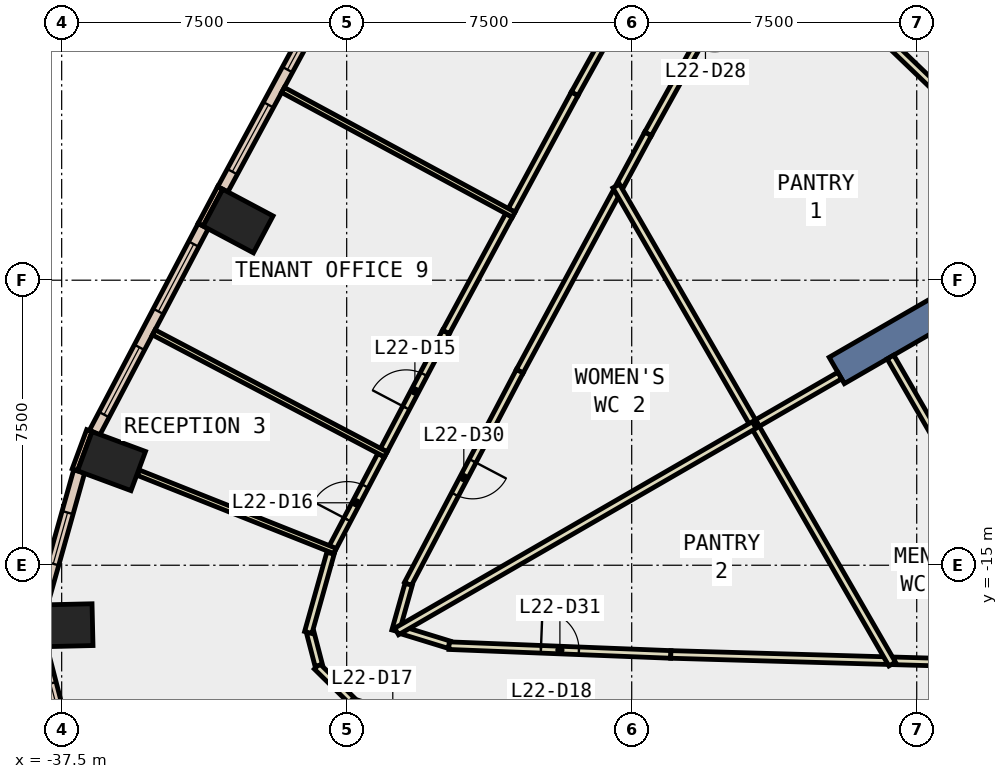
"""IFC4 building model, lengths in metres.
Left out: names, types, materials, properties, quantities, classifications, styles, units other than length and angle.
Written with IfcOpenShell. Run it as: python <this file> out.ifc"""

import sys

from ifc_helpers import new_model, si_unit, direction, frame, frame_2d, origin, origin_2d, place, context, subcontext, project, spatial, rectangle, extrude, element, fill, save


model = new_model("IFC4")
c1 = context("Model", 3, precision=1e-05, world=origin(), true_north=direction((0.0, 1.0)))
c2 = subcontext(c1, "Body", "Model", "MODEL_VIEW")
j1 = project(units=[si_unit("LENGTHUNIT", "METRE"), si_unit("PLANEANGLEUNIT", "RADIAN")], contexts=[c1])
p1 = place(None, origin())
s1 = spatial("IfcSite", under=j1, at=p1, CompositionType="ELEMENT")
p2 = place(p1, origin())
s2 = spatial("IfcBuilding", under=s1, at=p2, CompositionType="ELEMENT")
p3 = place(p2, frame((0.0, 0.0, 103.4)))
s3 = spatial("IfcBuildingStorey", under=s2, at=p3, CompositionType="ELEMENT", Elevation=103.4)
for number, where, z_axis, x_axis in (
    (1, (-32.858, -5.943, -0.4), (0.0, 0.0, 1.0), (0.469, 0.883, 0.0)),
    (2, (-36.188, -12.261, -0.4), (0.0, 0.0, 1.0), (0.347, 0.938, 0.0)),
    (3, (-37.438, -16.581, -0.4), (0.0, 0.0, 1.0), (-0.023, 1.0, 0.0)),
):
    element("IfcColumn", number, at=place(p3, frame(where, z_axis=z_axis, x_axis=x_axis)), inside=s3, PredefinedType="COLUMN", context=c2, shape_type="SweptSolid", body=[
        extrude(rectangle(XDim=1.1, YDim=1.5, at=origin_2d()), origin(), (0.0, 0.0, 1.0), 4.2),
    ])
p4 = place(p3, frame((-9.31, -5.375, -0.4), z_axis=(0.0, 0.0, 1.0), x_axis=(-0.866017533419, -0.500013631625, 0.0)))
e4 = element("IfcWall", 4, at=p4, inside=s3, PredefinedType="SHEAR", context=c2, shape_type="SweptSolid", body=[
    extrude(rectangle(XDim=9.0, YDim=0.8, at=frame_2d((4.5, 0.0))), origin(), (0.0, 0.0, 1.0), 4.2),
])
p5 = place(p3, frame((-33.329, -5.071, 0.0), z_axis=(0.0, 0.0, 1.0), x_axis=(-0.46919310775, -0.883095593716, 0.0)))
e5 = element("IfcWall", 5, at=p5, inside=s3, PredefinedType="STANDARD", context=c2, shape_type="SweptSolid", body=[
    extrude(rectangle(XDim=1.099, YDim=0.15, at=frame_2d((0.55, 0.0))), origin(), (0.0, 0.0, 1.0), 3.8),
])
p6 = place(p3, frame((-36.771, -11.458, 0.0), z_axis=(0.0, 0.0, 1.0), x_axis=(-0.347205967468, -0.937788897436, 0.0)))
e6 = element("IfcWall", 6, at=p6, inside=s3, PredefinedType="STANDARD", context=c2, shape_type="SweptSolid", body=[
    extrude(rectangle(XDim=1.1, YDim=0.15, at=frame_2d((0.55, 0.0))), origin(), (0.0, 0.0, 1.0), 3.8),
])
p7 = place(p3, frame((-30.357, 0.262, 0.0), z_axis=(0.0, 0.0, 1.0), x_axis=(-0.475573079782, -0.879676216449, 0.0)))
e7 = element("IfcWall", 7, at=p7, inside=s3, PredefinedType="STANDARD", context=c2, shape_type="SweptSolid", body=[
    extrude(rectangle(XDim=6.104, YDim=0.3, at=frame_2d((3.052, 0.0))), origin(), (0.0, 0.0, 1.0), 3.8),
])
p8 = place(p7, frame((0.526, 0.0, 0.9)))
e8 = element("IfcOpeningElement", 8, at=p8, cuts=e7, PredefinedType="OPENING", context=c2, shape_type="SweptSolid", body=[
    extrude(rectangle(XDim=2.0, YDim=2.6, at=frame_2d((1.0, 1.3))), frame((0.0, 0.16, 0.0), z_axis=(0.0, -1.0, 0.0), x_axis=(1.0, 0.0, 0.0)), (0.0, 0.0, 1.0), 0.32),
])
p9 = place(p7, frame((3.578, 0.0, 0.9)))
e9 = element("IfcOpeningElement", 9, at=p9, cuts=e7, PredefinedType="OPENING", context=c2, shape_type="SweptSolid", body=[
    extrude(rectangle(XDim=2.0, YDim=2.6, at=frame_2d((1.0, 1.3))), frame((0.0, 0.16, 0.0), z_axis=(0.0, -1.0, 0.0), x_axis=(1.0, 0.0, 0.0)), (0.0, 0.0, 1.0), 0.32),
])
p10 = place(p3, frame((-33.776, -6.077, 0.0), z_axis=(0.0, 0.0, 1.0), x_axis=(-0.465380908665, -0.88511050714, 0.0)))
e10 = element("IfcWall", 10, at=p10, inside=s3, PredefinedType="STANDARD", context=c2, shape_type="SweptSolid", body=[
    extrude(rectangle(XDim=6.139, YDim=0.3, at=frame_2d((3.07, 0.0))), origin(), (0.0, 0.0, 1.0), 3.8),
])
p11 = place(p10, frame((0.535, 0.0, 0.9)))
e11 = element("IfcOpeningElement", 11, at=p11, cuts=e10, PredefinedType="OPENING", context=c2, shape_type="SweptSolid", body=[
    extrude(rectangle(XDim=2.0, YDim=2.6, at=frame_2d((1.0, 1.3))), frame((0.0, 0.16, 0.0), z_axis=(0.0, -1.0, 0.0), x_axis=(1.0, 0.0, 0.0)), (0.0, 0.0, 1.0), 0.32),
])
p12 = place(p10, frame((3.604, 0.0, 0.9)))
e12 = element("IfcOpeningElement", 12, at=p12, cuts=e10, PredefinedType="OPENING", context=c2, shape_type="SweptSolid", body=[
    extrude(rectangle(XDim=2.0, YDim=2.6, at=frame_2d((1.0, 1.3))), frame((0.0, 0.16, 0.0), z_axis=(0.0, -1.0, 0.0), x_axis=(1.0, 0.0, 0.0)), (0.0, 0.0, 1.0), 0.32),
])
p13 = place(p3, frame((-37.04, -12.531, 0.0), z_axis=(0.0, 0.0, 1.0), x_axis=(-0.270054089595, -0.96284515302, 0.0)))
e13 = element("IfcWall", 13, at=p13, inside=s3, PredefinedType="STANDARD", context=c2, shape_type="SweptSolid", body=[
    extrude(rectangle(XDim=3.651, YDim=0.3, at=frame_2d((1.825, 0.0))), origin(), (0.0, 0.0, 1.0), 3.8),
])
p14 = place(p13, frame((1.125, 0.0, 0.9)))
e14 = element("IfcOpeningElement", 14, at=p14, cuts=e13, PredefinedType="OPENING", context=c2, shape_type="SweptSolid", body=[
    extrude(rectangle(XDim=1.4, YDim=2.6, at=frame_2d((0.7, 1.3))), frame((0.0, 0.16, 0.0), z_axis=(0.0, -1.0, 0.0), x_axis=(1.0, 0.0, 0.0)), (0.0, 0.0, 1.0), 0.32),
])
p15 = place(p3, frame((-38.042, -17.144, 0.0), z_axis=(0.0, 0.0, 1.0), x_axis=(0.251046938153, -0.967974914367, 0.0)))
e15 = element("IfcWall", 15, at=p15, inside=s3, PredefinedType="STANDARD", context=c2, shape_type="SweptSolid", body=[
    extrude(rectangle(XDim=3.398, YDim=0.3, at=frame_2d((1.699, 0.0))), origin(), (0.0, 0.0, 1.0), 3.8),
])
p16 = place(p15, frame((0.999, 0.0, 0.9)))
e16 = element("IfcOpeningElement", 16, at=p16, cuts=e15, PredefinedType="OPENING", context=c2, shape_type="SweptSolid", body=[
    extrude(rectangle(XDim=1.4, YDim=2.6, at=frame_2d((0.7, 1.3))), frame((0.0, 0.16, 0.0), z_axis=(0.0, -1.0, 0.0), x_axis=(1.0, 0.0, 0.0)), (0.0, 0.0, 1.0), 0.32),
])
p17 = place(p3, frame((-19.047, 1.799, 0.0), z_axis=(0.0, 0.0, 1.0), x_axis=(-0.485240396382, -0.87438078531, 0.0)))
e17 = element("IfcWall", 17, at=p17, inside=s3, PredefinedType="PARTITIONING", context=c2, shape_type="SweptSolid", body=[
    extrude(rectangle(XDim=6.232, YDim=0.2, at=frame_2d((3.116, 0.0))), origin(), (0.0, 0.0, 1.0), 3.8),
])
p18 = place(p17, frame((2.616, 0.0, 0.0)))
e18 = element("IfcOpeningElement", 18, at=p18, cuts=e17, PredefinedType="OPENING", context=c2, shape_type="SweptSolid", body=[
    extrude(rectangle(XDim=1.0, YDim=2.1, at=frame_2d((0.5, 1.05))), frame((0.0, 0.11, 0.0), z_axis=(0.0, -1.0, 0.0), x_axis=(1.0, 0.0, 0.0)), (0.0, 0.0, 1.0), 0.22),
])
p19 = place(p3, frame((-22.071, -3.65, 0.0), z_axis=(0.0, 0.0, 1.0), x_axis=(-0.475212034938, -0.879871309823, 0.0)))
e19 = element("IfcWall", 19, at=p19, inside=s3, PredefinedType="PARTITIONING", context=c2, shape_type="SweptSolid", body=[
    extrude(rectangle(XDim=1.557, YDim=0.2, at=frame_2d((0.779, 0.0))), origin(), (0.0, 0.0, 1.0), 3.8),
])
p20 = place(p3, frame((-15.596, -17.516, 0.0), z_axis=(0.0, 0.0, 1.0), x_axis=(0.99959813819, -0.028347171427, 0.0)))
e20 = element("IfcWall", 20, at=p20, inside=s3, PredefinedType="PARTITIONING", context=c2, shape_type="SweptSolid", body=[
    extrude(rectangle(XDim=1.016, YDim=0.2, at=frame_2d((0.508, 0.0))), origin(), (0.0, 0.0, 1.0), 3.8),
])
p21 = place(p3, frame((-22.906, -5.196, 0.0), z_axis=(0.0, 0.0, 1.0), x_axis=(-0.475448213767, -0.879743710421, 0.0)))
e21 = element("IfcWall", 21, at=p21, inside=s3, PredefinedType="PARTITIONING", context=c2, shape_type="SweptSolid", body=[
    extrude(rectangle(XDim=5.343, YDim=0.2, at=frame_2d((2.671, 0.0))), origin(), (0.0, 0.0, 1.0), 3.8),
])
p22 = place(p3, frame((-25.446, -9.896, 0.0), z_axis=(0.0, 0.0, 1.0), x_axis=(-0.465367816287, -0.885117390838, 0.0)))
e22 = element("IfcWall", 22, at=p22, inside=s3, PredefinedType="PARTITIONING", context=c2, shape_type="SweptSolid", body=[
    extrude(rectangle(XDim=6.326, YDim=0.2, at=frame_2d((3.163, 0.0))), origin(), (0.0, 0.0, 1.0), 3.8),
])
p23 = place(p22, frame((2.663, 0.0, 0.0)))
e23 = element("IfcOpeningElement", 23, at=p23, cuts=e22, PredefinedType="OPENING", context=c2, shape_type="SweptSolid", body=[
    extrude(rectangle(XDim=1.0, YDim=2.1, at=frame_2d((0.5, 1.05))), frame((0.0, 0.11, 0.0), z_axis=(0.0, -1.0, 0.0), x_axis=(1.0, 0.0, 0.0)), (0.0, 0.0, 1.0), 0.22),
])
p24 = place(p3, frame((-28.37, -15.503, 0.0), z_axis=(0.0, 0.0, 1.0), x_axis=(-0.270645732093, -0.962679015924, 0.0)))
e24 = element("IfcWall", 24, at=p24, inside=s3, PredefinedType="PARTITIONING", context=c2, shape_type="SweptSolid", body=[
    extrude(rectangle(XDim=1.275, YDim=0.2, at=frame_2d((0.637, 0.0))), origin(), (0.0, 0.0, 1.0), 3.8),
])
p25 = place(p3, frame((-28.503, -16.722, 0.0), z_axis=(0.0, 0.0, 1.0), x_axis=(0.95579582576, -0.294031187904, 0.0)))
e25 = element("IfcWall", 25, at=p25, inside=s3, PredefinedType="PARTITIONING", context=c2, shape_type="SweptSolid", body=[
    extrude(rectangle(XDim=1.255, YDim=0.2, at=frame_2d((0.628, 0.0))), origin(), (0.0, 0.0, 1.0), 3.8),
])
p26 = place(p3, frame((-27.307, -17.116, 0.0), z_axis=(0.0, 0.0, 1.0), x_axis=(0.999217829656, -0.039544012168, 0.0)))
e26 = element("IfcWall", 26, at=p26, inside=s3, PredefinedType="PARTITIONING", context=c2, shape_type="SweptSolid", body=[
    extrude(rectangle(XDim=5.841, YDim=0.2, at=frame_2d((2.92, 0.0))), origin(), (0.0, 0.0, 1.0), 3.8),
])
p27 = place(p26, frame((2.42, 0.0, 0.0)))
e27 = element("IfcOpeningElement", 27, at=p27, cuts=e26, PredefinedType="OPENING", context=c2, shape_type="SweptSolid", body=[
    extrude(rectangle(XDim=1.0, YDim=2.1, at=frame_2d((0.5, 1.05))), frame((0.0, 0.11, 0.0), z_axis=(0.0, -1.0, 0.0), x_axis=(1.0, 0.0, 0.0)), (0.0, 0.0, 1.0), 0.22),
])
p28 = place(p3, frame((-21.471, -17.347, 0.0), z_axis=(0.0, 0.0, 1.0), x_axis=(0.999587337564, -0.028725504044, 0.0)))
e28 = element("IfcWall", 28, at=p28, inside=s3, PredefinedType="PARTITIONING", context=c2, shape_type="SweptSolid", body=[
    extrude(rectangle(XDim=5.677, YDim=0.2, at=frame_2d((2.839, 0.0))), origin(), (0.0, 0.0, 1.0), 3.8),
])
p29 = place(p3, frame((-25.658, -5.661, 0.0), z_axis=(0.0, 0.0, 1.0), x_axis=(0.47543942367, 0.87974846088, 0.0)))
e29 = element("IfcWall", 29, at=p29, inside=s3, PredefinedType="PARTITIONING", context=c2, shape_type="SweptSolid", body=[
    extrude(rectangle(XDim=3.487, YDim=0.2, at=frame_2d((1.744, 0.0))), origin(), (0.0, 0.0, 1.0), 3.8),
])
p30 = place(p3, frame((-24.0, -2.593, 0.0), z_axis=(0.0, 0.0, 1.0), x_axis=(0.485148833338, 0.874431592242, 0.0)))
e30 = element("IfcWall", 30, at=p30, inside=s3, PredefinedType="PARTITIONING", context=c2, shape_type="SweptSolid", body=[
    extrude(rectangle(XDim=7.049, YDim=0.2, at=frame_2d((3.525, 0.0))), origin(), (0.0, 0.0, 1.0), 3.8),
])
p31 = place(p30, frame((3.099, 0.0, 0.0)))
e31 = element("IfcOpeningElement", 31, at=p31, cuts=e30, PredefinedType="OPENING", context=c2, shape_type="SweptSolid", body=[
    extrude(rectangle(XDim=1.0, YDim=2.1, at=frame_2d((0.5, 1.05))), frame((0.0, 0.11, 0.0), z_axis=(0.0, -1.0, 0.0), x_axis=(1.0, 0.0, 0.0)), (0.0, 0.0, 1.0), 0.22),
])
p32 = place(p3, frame((-29.023, -11.972, 0.0), z_axis=(0.0, 0.0, 1.0), x_axis=(0.465457263931, 0.885070356217, 0.0)))
e32 = element("IfcWall", 32, at=p32, inside=s3, PredefinedType="PARTITIONING", context=c2, shape_type="SweptSolid", body=[
    extrude(rectangle(XDim=3.515, YDim=0.2, at=frame_2d((1.757, 0.0))), origin(), (0.0, 0.0, 1.0), 3.8),
])
p33 = place(p32, frame((1.257, 0.0, 0.0)))
e33 = element("IfcOpeningElement", 33, at=p33, cuts=e32, PredefinedType="OPENING", context=c2, shape_type="SweptSolid", body=[
    extrude(rectangle(XDim=1.0, YDim=2.1, at=frame_2d((0.5, 1.05))), frame((0.0, 0.11, 0.0), z_axis=(0.0, -1.0, 0.0), x_axis=(1.0, 0.0, 0.0)), (0.0, 0.0, 1.0), 0.22),
])
p34 = place(p3, frame((-27.387, -8.861, 0.0), z_axis=(0.0, 0.0, 1.0), x_axis=(0.475193364801, 0.879881393171, 0.0)))
e34 = element("IfcWall", 34, at=p34, inside=s3, PredefinedType="PARTITIONING", context=c2, shape_type="SweptSolid", body=[
    extrude(rectangle(XDim=3.487, YDim=0.2, at=frame_2d((1.744, 0.0))), origin(), (0.0, 0.0, 1.0), 3.8),
])
p35 = place(p3, frame((-30.41, -14.61, 0.0), z_axis=(0.0, 0.0, 1.0), x_axis=(0.46516343569, 0.885224817827, 0.0)))
e35 = element("IfcWall", 35, at=p35, inside=s3, PredefinedType="PARTITIONING", context=c2, shape_type="SweptSolid", body=[
    extrude(rectangle(XDim=2.831, YDim=0.2, at=frame_2d((1.416, 0.0))), origin(), (0.0, 0.0, 1.0), 3.8),
])
p36 = place(p35, frame((0.916, 0.0, 0.0)))
e36 = element("IfcOpeningElement", 36, at=p36, cuts=e35, PredefinedType="OPENING", context=c2, shape_type="SweptSolid", body=[
    extrude(rectangle(XDim=1.0, YDim=2.1, at=frame_2d((0.5, 1.05))), frame((0.0, 0.11, 0.0), z_axis=(0.0, -1.0, 0.0), x_axis=(1.0, 0.0, 0.0)), (0.0, 0.0, 1.0), 0.22),
])
p37 = place(p3, frame((-27.676, -19.278, 0.0), z_axis=(0.0, 0.0, 1.0), x_axis=(-0.95581080774, 0.293982482143, 0.0)))
e37 = element("IfcWall", 37, at=p37, inside=s3, PredefinedType="PARTITIONING", context=c2, shape_type="SweptSolid", body=[
    extrude(rectangle(XDim=2.324, YDim=0.2, at=frame_2d((1.162, 0.0))), origin(), (0.0, 0.0, 1.0), 3.8),
])
p38 = place(p37, frame((0.662, 0.0, 0.0)))
e38 = element("IfcOpeningElement", 38, at=p38, cuts=e37, PredefinedType="OPENING", context=c2, shape_type="SweptSolid", body=[
    extrude(rectangle(XDim=1.0, YDim=2.1, at=frame_2d((0.5, 1.05))), frame((0.0, 0.11, 0.0), z_axis=(0.0, -1.0, 0.0), x_axis=(1.0, 0.0, 0.0)), (0.0, 0.0, 1.0), 0.22),
])
p39 = place(p3, frame((-29.873, -18.554, 0.0), z_axis=(0.0, 0.0, 1.0), x_axis=(-0.712546188185, 0.701625206006, 0.0)))
e39 = element("IfcWall", 39, at=p39, inside=s3, PredefinedType="PARTITIONING", context=c2, shape_type="SweptSolid", body=[
    extrude(rectangle(XDim=1.274, YDim=0.2, at=frame_2d((0.637, 0.0))), origin(), (0.0, 0.0, 1.0), 3.8),
])
p40 = place(p3, frame((-30.735, -17.634, 0.0), z_axis=(0.0, 0.0, 1.0), x_axis=(-0.251095196118, 0.967962397248, 0.0)))
e40 = element("IfcWall", 40, at=p40, inside=s3, PredefinedType="PARTITIONING", context=c2, shape_type="SweptSolid", body=[
    extrude(rectangle(XDim=0.892, YDim=0.2, at=frame_2d((0.446, 0.0))), origin(), (0.0, 0.0, 1.0), 3.8),
])
p41 = place(p3, frame((-31.011, -16.77, 0.0), z_axis=(0.0, 0.0, 1.0), x_axis=(0.270131711391, 0.962823378664, 0.0)))
e41 = element("IfcWall", 41, at=p41, inside=s3, PredefinedType="PARTITIONING", context=c2, shape_type="SweptSolid", body=[
    extrude(rectangle(XDim=2.166, YDim=0.2, at=frame_2d((1.083, 0.0))), origin(), (0.0, 0.0, 1.0), 3.8),
])
p42 = place(p3, frame((-13.847, -12.716, 0.0), z_axis=(0.0, 0.0, 1.0), x_axis=(-0.499861859587, 0.866105144501, 0.0)))
e42 = element("IfcWall", 42, at=p42, inside=s3, PredefinedType="PARTITIONING", context=c2, shape_type="SweptSolid", body=[
    extrude(rectangle(XDim=3.689, YDim=0.2, at=frame_2d((1.844, 0.0))), origin(), (0.0, 0.0, 1.0), 3.8),
])
p43 = place(p3, frame((-17.027, -10.009, 0.0), z_axis=(0.0, 0.0, 1.0), x_axis=(-0.865950948929, -0.500128937424, 0.0)))
e43 = element("IfcWall", 43, at=p43, inside=s3, PredefinedType="PARTITIONING", context=c2, shape_type="SweptSolid", body=[
    extrude(rectangle(XDim=2.599, YDim=0.2, at=frame_2d((1.3, 0.0))), origin(), (0.0, 0.0, 1.0), 3.8),
])
p44 = place(p3, frame((-19.278, -11.309, 0.0), z_axis=(0.0, 0.0, 1.0), x_axis=(-0.500044545065, 0.865999684151, 0.0)))
e44 = element("IfcWall", 44, at=p44, inside=s3, PredefinedType="PARTITIONING", context=c2, shape_type="SweptSolid", body=[
    extrude(rectangle(XDim=7.261, YDim=0.2, at=frame_2d((3.63, 0.0))), origin(), (0.0, 0.0, 1.0), 3.8),
])
p45 = place(p3, frame((-15.646, -17.6, 0.0), z_axis=(0.0, 0.0, 1.0), x_axis=(-0.499953299825, 0.866052364464, 0.0)))
e45 = element("IfcWall", 45, at=p45, inside=s3, PredefinedType="PARTITIONING", context=c2, shape_type="SweptSolid", body=[
    extrude(rectangle(XDim=7.263, YDim=0.2, at=frame_2d((3.631, 0.0))), origin(), (0.0, 0.0, 1.0), 3.8),
])
p46 = place(p3, frame((-19.277, -11.311, 0.0), z_axis=(0.0, 0.0, 1.0), x_axis=(-0.866078939042, -0.499907262747, 0.0)))
e46 = element("IfcWall", 46, at=p46, inside=s3, PredefinedType="PARTITIONING", context=c2, shape_type="SweptSolid", body=[
    extrude(rectangle(XDim=10.864, YDim=0.2, at=frame_2d((5.432, 0.0))), origin(), (0.0, 0.0, 1.0), 3.8),
])
p47 = place(p3, frame((-25.606, -5.775, 0.0), z_axis=(0.0, 0.0, 1.0), x_axis=(-0.87974530848, 0.475445256793, 0.0)))
e47 = element("IfcWall", 47, at=p47, inside=s3, PredefinedType="PARTITIONING", context=c2, shape_type="SweptSolid", body=[
    extrude(rectangle(XDim=6.901, YDim=0.15, at=frame_2d((3.45, 0.0))), origin(), (0.0, 0.0, 1.0), 3.8),
])
p48 = place(p3, frame((-28.969, -12.084, 0.0), z_axis=(0.0, 0.0, 1.0), x_axis=(-0.885142220222, 0.465320588391, 0.0)))
e48 = element("IfcWall", 48, at=p48, inside=s3, PredefinedType="PARTITIONING", context=c2, shape_type="SweptSolid", body=[
    extrude(rectangle(XDim=6.9, YDim=0.15, at=frame_2d((3.45, 0.0))), origin(), (0.0, 0.0, 1.0), 3.8),
])
p49 = place(p3, frame((-30.306, -14.625, 0.0), z_axis=(0.0, 0.0, 1.0), x_axis=(-0.929128339298, 0.369757392235, 0.0)))
e49 = element("IfcWall", 49, at=p49, inside=s3, PredefinedType="PARTITIONING", context=c2, shape_type="SweptSolid", body=[
    extrude(rectangle(XDim=5.569, YDim=0.15, at=frame_2d((2.784, 0.0))), origin(), (0.0, 0.0, 1.0), 3.8),
])
p50 = place(p3, frame((-10.96, -5.834, 0.0), z_axis=(0.0, 0.0, 1.0), x_axis=(-0.721236335428, 0.692689070549, 0.0)))
e50 = element("IfcWall", 50, at=p50, inside=s3, PredefinedType="PARTITIONING", context=c2, shape_type="SweptSolid", body=[
    extrude(rectangle(XDim=11.246, YDim=0.2, at=frame_2d((5.623, 0.0))), origin(), (0.0, 0.0, 1.0), 3.8),
])
p51 = place(p8, origin())
e51 = element("IfcWindow", 51, at=p51, inside=s3, PartitioningType="SINGLE_PANEL", PredefinedType="WINDOW", context=c2, shape_type="SweptSolid", body=[
    extrude(rectangle(XDim=2.0, YDim=2.6, at=frame_2d((1.0, 1.3))), frame((0.0, 0.03, 0.0), z_axis=(0.0, -1.0, 0.0), x_axis=(1.0, 0.0, 0.0)), (0.0, 0.0, 1.0), 0.06),
])
fill(e8, e51)
p52 = place(p9, origin())
e52 = element("IfcWindow", 52, at=p52, inside=s3, PartitioningType="SINGLE_PANEL", PredefinedType="WINDOW", context=c2, shape_type="SweptSolid", body=[
    extrude(rectangle(XDim=2.0, YDim=2.6, at=frame_2d((1.0, 1.3))), frame((0.0, 0.03, 0.0), z_axis=(0.0, -1.0, 0.0), x_axis=(1.0, 0.0, 0.0)), (0.0, 0.0, 1.0), 0.06),
])
fill(e9, e52)
p53 = place(p11, origin())
e53 = element("IfcWindow", 53, at=p53, inside=s3, PartitioningType="SINGLE_PANEL", PredefinedType="WINDOW", context=c2, shape_type="SweptSolid", body=[
    extrude(rectangle(XDim=2.0, YDim=2.6, at=frame_2d((1.0, 1.3))), frame((0.0, 0.03, 0.0), z_axis=(0.0, -1.0, 0.0), x_axis=(1.0, 0.0, 0.0)), (0.0, 0.0, 1.0), 0.06),
])
fill(e11, e53)
p54 = place(p12, origin())
e54 = element("IfcWindow", 54, at=p54, inside=s3, PartitioningType="SINGLE_PANEL", PredefinedType="WINDOW", context=c2, shape_type="SweptSolid", body=[
    extrude(rectangle(XDim=2.0, YDim=2.6, at=frame_2d((1.0, 1.3))), frame((0.0, 0.03, 0.0), z_axis=(0.0, -1.0, 0.0), x_axis=(1.0, 0.0, 0.0)), (0.0, 0.0, 1.0), 0.06),
])
fill(e12, e54)
p55 = place(p14, origin())
e55 = element("IfcWindow", 55, at=p55, inside=s3, PartitioningType="SINGLE_PANEL", PredefinedType="WINDOW", context=c2, shape_type="SweptSolid", body=[
    extrude(rectangle(XDim=1.4, YDim=2.6, at=frame_2d((0.7, 1.3))), frame((0.0, 0.03, 0.0), z_axis=(0.0, -1.0, 0.0), x_axis=(1.0, 0.0, 0.0)), (0.0, 0.0, 1.0), 0.06),
])
fill(e14, e55)
p56 = place(p16, origin())
e56 = element("IfcWindow", 56, at=p56, inside=s3, PartitioningType="SINGLE_PANEL", PredefinedType="WINDOW", context=c2, shape_type="SweptSolid", body=[
    extrude(rectangle(XDim=1.4, YDim=2.6, at=frame_2d((0.7, 1.3))), frame((0.0, 0.03, 0.0), z_axis=(0.0, -1.0, 0.0), x_axis=(1.0, 0.0, 0.0)), (0.0, 0.0, 1.0), 0.06),
])
fill(e16, e56)
p57 = place(p33, origin())
e57 = element("IfcDoor", 57, at=p57, inside=s3, OperationType="SINGLE_SWING_RIGHT", PredefinedType="DOOR", context=c2, shape_type="SweptSolid", body=[
    extrude(rectangle(XDim=1.0, YDim=2.1, at=frame_2d((0.5, 1.05))), frame((0.0, 0.025, 0.0), z_axis=(0.0, -1.0, 0.0), x_axis=(1.0, 0.0, 0.0)), (0.0, 0.0, 1.0), 0.05),
])
fill(e33, e57)
p58 = place(p36, origin())
e58 = element("IfcDoor", 58, at=p58, inside=s3, OperationType="SINGLE_SWING_LEFT", PredefinedType="DOOR", context=c2, shape_type="SweptSolid", body=[
    extrude(rectangle(XDim=1.0, YDim=2.1, at=frame_2d((0.5, 1.05))), frame((0.0, 0.025, 0.0), z_axis=(0.0, -1.0, 0.0), x_axis=(1.0, 0.0, 0.0)), (0.0, 0.0, 1.0), 0.05),
])
fill(e36, e58)
p59 = place(p23, origin())
e59 = element("IfcDoor", 59, at=p59, inside=s3, OperationType="SINGLE_SWING_LEFT", PredefinedType="DOOR", context=c2, shape_type="SweptSolid", body=[
    extrude(rectangle(XDim=1.0, YDim=2.1, at=frame_2d((0.5, 1.05))), frame((0.0, 0.025, 0.0), z_axis=(0.0, -1.0, 0.0), x_axis=(1.0, 0.0, 0.0)), (0.0, 0.0, 1.0), 0.05),
])
fill(e23, e59)
p60 = place(p27, origin())
e60 = element("IfcDoor", 60, at=p60, inside=s3, OperationType="SINGLE_SWING_LEFT", PredefinedType="DOOR", context=c2, shape_type="SweptSolid", body=[
    extrude(rectangle(XDim=1.0, YDim=2.1, at=frame_2d((0.5, 1.05))), frame((0.0, 0.025, 0.0), z_axis=(0.0, -1.0, 0.0), x_axis=(1.0, 0.0, 0.0)), (0.0, 0.0, 1.0), 0.05),
])
fill(e27, e60)
save(model, sys.argv[1])
